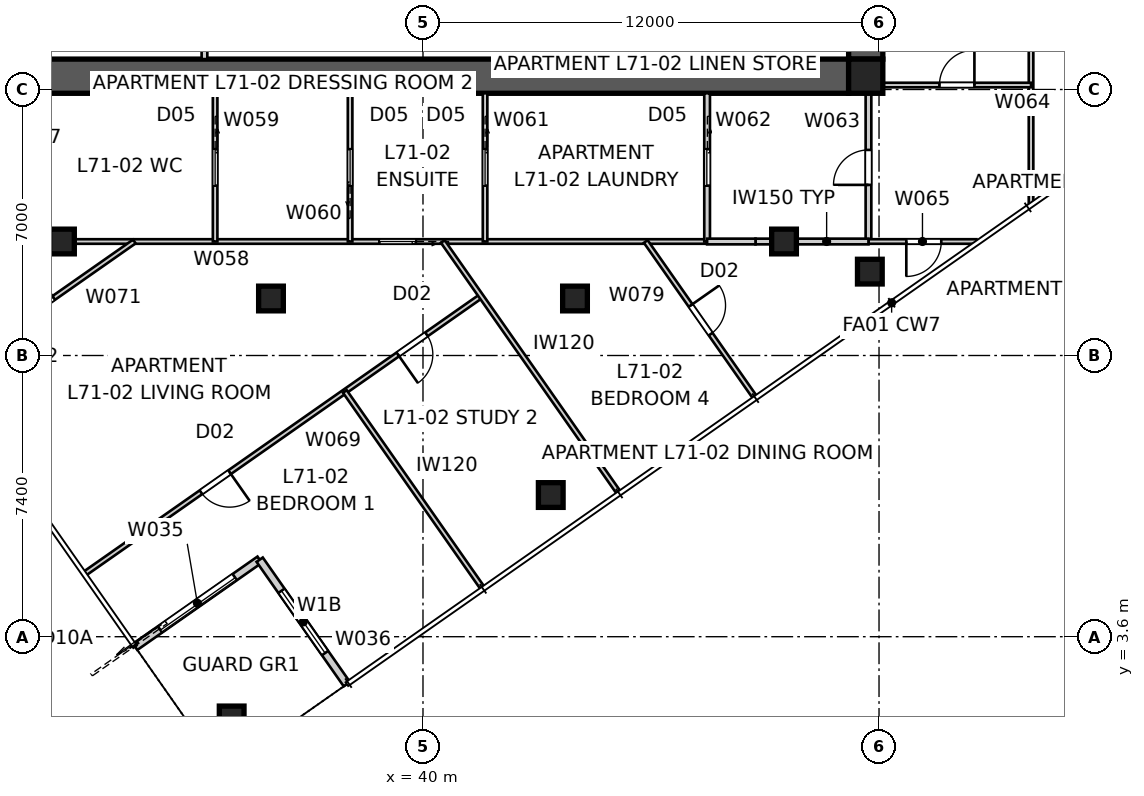
"""IFC4 building model, lengths in metres.
Left out: names, types, materials, properties, quantities, classifications, styles, units other than length and angle.
Written with IfcOpenShell. Run it as: python <this file> out.ifc"""

import sys

from ifc_helpers import new_model, si_unit, direction, frame, frame_2d, origin, origin_2d, place, context, subcontext, project, spatial, polyline, rectangle, outline, extrude, element, fill, save


model = new_model("IFC4")
c1 = context("Model", 3, precision=1e-05, world=origin(), true_north=direction((0.0, 1.0)))
c2 = subcontext(c1, "Body", "Model", "MODEL_VIEW")
j1 = project(units=[si_unit("LENGTHUNIT", "METRE"), si_unit("PLANEANGLEUNIT", "RADIAN")], contexts=[c1])
p1 = place(None, origin())
s1 = spatial("IfcSite", under=j1, at=p1, CompositionType="ELEMENT")
p2 = place(p1, origin())
s2 = spatial("IfcBuilding", under=s1, at=p2, CompositionType="ELEMENT")
p3 = place(p2, frame((0.0, 0.0, 257.4)))
s3 = spatial("IfcBuildingStorey", under=s2, at=p3, CompositionType="ELEMENT", Elevation=257.4)
p4 = place(p3, frame((51.2, 18.35, 0.0), z_axis=(0.0, 0.0, 1.0), x_axis=(-1.0, 0.0, 0.0)))
e1 = element("IfcWall", 1, at=p4, inside=s3, PredefinedType="SHEAR", context=c2, shape_type="SweptSolid", body=[
    extrude(outline(polyline([(0.0, -0.45), (22.4, -0.45), (22.4, -0.025), (22.85, -0.025), (22.85, 0.025), (22.4, 0.025), (22.4, 0.45), (0.0, 0.45), (0.0, 0.025), (-0.45, 0.025), (-0.45, -0.025), (0.0, -0.025), (0.0, -0.45)])), origin(), (0.0, 0.0, 1.0), 3.4),
])
p5 = place(p3, frame((51.65, 18.8, 0.0), z_axis=(0.0, 0.0, 1.0), x_axis=(0.0, 1.0, 0.0)))
e2 = element("IfcWall", 2, at=p5, inside=s3, PredefinedType="SHEAR", context=c2, shape_type="SweptSolid", body=[
    extrude(outline(polyline([(0.0, -0.45), (22.4, -0.45), (22.4, -0.025), (22.85, -0.025), (22.85, 0.025), (22.4, 0.025), (22.4, 0.45), (0.0, 0.45), (0.0, 0.025), (-0.45, 0.025), (-0.45, -0.025), (0.0, -0.025), (0.0, -0.45)])), origin(), (0.0, 0.0, 1.0), 3.4),
])
p6 = place(p5, frame((11.14, 0.0, 0.0)))
e3 = element("IfcOpeningElement", 3, at=p6, cuts=e2, PredefinedType="OPENING", context=c2, shape_type="SweptSolid", body=[
    extrude(rectangle(XDim=1.02, YDim=2.4, at=frame_2d((0.51, 1.2))), frame((0.0, 0.46, 0.0), z_axis=(0.0, -1.0, 0.0), x_axis=(1.0, 0.0, 0.0)), (0.0, 0.0, 1.0), 0.92),
])
p7 = place(p3, frame((51.65, 18.35, 0.0), z_axis=(0.0, 0.0, 1.0), x_axis=(1.0, 0.0, 0.0)))
e4 = element("IfcColumn", 4, at=p7, inside=s3, PredefinedType="COLUMN", context=c2, shape_type="SweptSolid", body=[
    extrude(rectangle(XDim=0.9, YDim=0.9, at=origin_2d()), origin(), (0.0, 0.0, 1.0), 3.4),
])
for number, where, z_axis, x_axis in (
    (5, (34.966, 1.449, 0.0), (0.0, 0.0, 1.0), (1.0, 0.0, 0.0)),
    (6, (43.362, 7.328, 0.0), (0.0, 0.0, 1.0), (1.0, 0.0, 0.0)),
    (7, (51.758, 13.207, 0.0), (0.0, 0.0, 1.0), (1.0, 0.0, 0.0)),
    (8, (30.5, 14.0, 0.0), (0.0, 0.0, 1.0), (1.0, 0.0, 0.0)),
    (9, (36.0, 12.5, 0.0), (0.0, 0.0, 1.0), (1.0, 0.0, 0.0)),
    (10, (44.0, 12.5, 0.0), (0.0, 0.0, 1.0), (1.0, 0.0, 0.0)),
    (11, (49.5, 14.0, 0.0), (0.0, 0.0, 1.0), (1.0, 0.0, 0.0)),
):
    element("IfcColumn", number, at=place(p3, frame(where, z_axis=z_axis, x_axis=x_axis)), inside=s3, PredefinedType="COLUMN", context=c2, shape_type="SweptSolid", body=[
        extrude(rectangle(XDim=0.65, YDim=0.65, at=origin_2d()), origin(), (0.0, 0.0, 1.0), 3.4),
    ])
p8 = place(p3, frame((32.426, 3.333, 0.0), z_axis=(0.0, 0.0, 1.0), x_axis=(0.819165963305, 0.573556557423, 0.0)))
e12 = element("IfcWall", 12, at=p8, inside=s3, PredefinedType="SOLIDWALL", context=c2, shape_type="SweptSolid", body=[
    extrude(rectangle(XDim=4.0, YDim=0.2, at=frame_2d((2.0, 0.0))), origin(), (0.0, 0.0, 1.0), 3.25),
])
p9 = place(p8, frame((0.8, 0.0, 0.0)))
e13 = element("IfcOpeningElement", 13, at=p9, cuts=e12, PredefinedType="OPENING", context=c2, shape_type="SweptSolid", body=[
    extrude(rectangle(XDim=2.4, YDim=2.1, at=frame_2d((1.2, 1.05))), frame((0.0, 0.11, 0.0), z_axis=(0.0, -1.0, 0.0), x_axis=(1.0, 0.0, 0.0)), (0.0, 0.0, 1.0), 0.22),
])
p10 = place(p3, frame((35.702, 5.627, 0.0), z_axis=(0.0, 0.0, 1.0), x_axis=(0.573597512525, -0.819137286189, 0.0)))
e14 = element("IfcWall", 14, at=p10, inside=s3, PredefinedType="SOLIDWALL", context=c2, shape_type="SweptSolid", body=[
    extrude(rectangle(XDim=4.0, YDim=0.2, at=frame_2d((2.0, 0.0))), origin(), (0.0, 0.0, 1.0), 3.25),
])
p11 = place(p10, frame((1.0, 0.0, 0.45)))
e15 = element("IfcOpeningElement", 15, at=p11, cuts=e14, PredefinedType="OPENING", context=c2, shape_type="SweptSolid", body=[
    extrude(rectangle(XDim=2.0, YDim=1.8, at=frame_2d((1.0, 0.9))), frame((0.0, 0.11, 0.0), z_axis=(0.0, -1.0, 0.0), x_axis=(1.0, 0.0, 0.0)), (0.0, 0.0, 1.0), 0.22),
])
p12 = place(p3, frame((45.75, 18.8, 0.0), z_axis=(0.0, 0.0, 1.0), x_axis=(0.0, 1.0, 0.0)))
e16 = element("IfcWall", 16, at=p12, inside=s3, PredefinedType="SOLIDWALL", context=c2, shape_type="SweptSolid", body=[
    extrude(rectangle(XDim=5.95, YDim=0.15, at=frame_2d((2.975, 0.0))), origin(), (0.0, 0.0, 1.0), 3.25),
])
p13 = place(p12, frame((2.515, 0.0, 0.0)))
e17 = element("IfcOpeningElement", 17, at=p13, cuts=e16, PredefinedType="OPENING", context=c2, shape_type="SweptSolid", body=[
    extrude(rectangle(XDim=0.92, YDim=2.1, at=frame_2d((0.46, 1.05))), frame((0.0, 0.085, 0.0), z_axis=(0.0, -1.0, 0.0), x_axis=(1.0, 0.0, 0.0)), (0.0, 0.0, 1.0), 0.17),
])
p14 = place(p3, frame((34.25, 18.8, 0.0), z_axis=(0.0, 0.0, 1.0), x_axis=(0.0, 1.0, 0.0)))
e18 = element("IfcWall", 18, at=p14, inside=s3, PredefinedType="SOLIDWALL", context=c2, shape_type="SweptSolid", body=[
    extrude(rectangle(XDim=5.9, YDim=0.15, at=frame_2d((2.95, 0.0))), origin(), (0.0, 0.0, 1.0), 3.25),
])
p15 = place(p3, frame((56.0, 41.203, 0.0), z_axis=(0.0, 0.0, 1.0), x_axis=(0.0, -1.0, 0.0)))
e19 = element("IfcWall", 19, at=p15, inside=s3, PredefinedType="PARTITIONING", context=c2, shape_type="SweptSolid", body=[
    extrude(rectangle(XDim=26.198, YDim=0.12, at=frame_2d((13.099, 0.0))), origin(), (0.0, 0.0, 1.0), 2.55),
])
p16 = place(p15, frame((21.188, 0.0, 0.0)))
e20 = element("IfcOpeningElement", 20, at=p16, cuts=e19, PredefinedType="OPENING", context=c2, shape_type="SweptSolid", body=[
    extrude(rectangle(XDim=0.92, YDim=2.34, at=frame_2d((0.46, 1.17))), frame((0.0, 0.07, 0.0), z_axis=(0.0, -1.0, 0.0), x_axis=(1.0, 0.0, 0.0)), (0.0, 0.0, 1.0), 0.14),
])
p17 = place(p15, frame((17.537, 0.0, 0.0)))
e21 = element("IfcOpeningElement", 21, at=p17, cuts=e19, PredefinedType="OPENING", context=c2, shape_type="SweptSolid", body=[
    extrude(rectangle(XDim=0.92, YDim=2.34, at=frame_2d((0.46, 1.17))), frame((0.0, 0.07, 0.0), z_axis=(0.0, -1.0, 0.0), x_axis=(1.0, 0.0, 0.0)), (0.0, 0.0, 1.0), 0.14),
])
p18 = place(p15, frame((2.221, 0.0, 0.0)))
e22 = element("IfcOpeningElement", 22, at=p18, cuts=e19, PredefinedType="OPENING", context=c2, shape_type="SweptSolid", body=[
    extrude(rectangle(XDim=0.96, YDim=2.1, at=frame_2d((0.48, 1.05))), frame((0.0, 0.07, 0.0), z_axis=(0.0, -1.0, 0.0), x_axis=(1.0, 0.0, 0.0)), (0.0, 0.0, 1.0), 0.14),
])
p19 = place(p3, frame((47.476, 14.0, 0.0), z_axis=(0.0, 0.0, 1.0), x_axis=(-1.0, 0.0, 0.0)))
e23 = element("IfcWall", 23, at=p19, inside=s3, PredefinedType="PARTITIONING", context=c2, shape_type="SweptSolid", body=[
    extrude(rectangle(XDim=22.471, YDim=0.12, at=frame_2d((11.235, 0.0))), origin(), (0.0, 0.0, 1.0), 2.55),
])
p20 = place(p19, frame((7.664, 0.0, 0.0)))
e24 = element("IfcOpeningElement", 24, at=p20, cuts=e23, PredefinedType="OPENING", context=c2, shape_type="SweptSolid", body=[
    extrude(rectangle(XDim=0.96, YDim=2.1, at=frame_2d((0.48, 1.05))), frame((0.0, 0.07, 0.0), z_axis=(0.0, -1.0, 0.0), x_axis=(1.0, 0.0, 0.0)), (0.0, 0.0, 1.0), 0.14),
])
p21 = place(p3, frame((34.53, 17.9, 0.0), z_axis=(0.0, 0.0, 1.0), x_axis=(0.0, -1.0, 0.0)))
e25 = element("IfcWall", 25, at=p21, inside=s3, PredefinedType="PARTITIONING", context=c2, shape_type="SweptSolid", body=[
    extrude(rectangle(XDim=3.9, YDim=0.12, at=frame_2d((1.95, 0.0))), origin(), (0.0, 0.0, 1.0), 3.25),
])
p22 = place(p21, frame((1.47, 0.0, 0.0)))
e26 = element("IfcOpeningElement", 26, at=p22, cuts=e25, PredefinedType="OPENING", context=c2, shape_type="SweptSolid", body=[
    extrude(rectangle(XDim=0.96, YDim=2.1, at=frame_2d((0.48, 1.05))), frame((0.0, 0.07, 0.0), z_axis=(0.0, -1.0, 0.0), x_axis=(1.0, 0.0, 0.0)), (0.0, 0.0, 1.0), 0.14),
])
p23 = place(p3, frame((38.082, 14.0, 0.0), z_axis=(0.0, 0.0, 1.0), x_axis=(0.0, 1.0, 0.0)))
e27 = element("IfcWall", 27, at=p23, inside=s3, PredefinedType="PARTITIONING", context=c2, shape_type="SweptSolid", body=[
    extrude(rectangle(XDim=3.9, YDim=0.12, at=frame_2d((1.95, 0.0))), origin(), (0.0, 0.0, 1.0), 3.25),
])
p24 = place(p23, frame((1.47, 0.0, 0.0)))
e28 = element("IfcOpeningElement", 28, at=p24, cuts=e27, PredefinedType="OPENING", context=c2, shape_type="SweptSolid", body=[
    extrude(rectangle(XDim=0.96, YDim=2.1, at=frame_2d((0.48, 1.05))), frame((0.0, 0.07, 0.0), z_axis=(0.0, -1.0, 0.0), x_axis=(1.0, 0.0, 0.0)), (0.0, 0.0, 1.0), 0.14),
])
p25 = place(p3, frame((41.634, 17.9, 0.0), z_axis=(0.0, 0.0, 1.0), x_axis=(0.0, -1.0, 0.0)))
e29 = element("IfcWall", 29, at=p25, inside=s3, PredefinedType="PARTITIONING", context=c2, shape_type="SweptSolid", body=[
    extrude(rectangle(XDim=3.9, YDim=0.12, at=frame_2d((1.95, 0.0))), origin(), (0.0, 0.0, 1.0), 3.25),
])
p26 = place(p25, frame((1.47, 0.0, 0.0)))
e30 = element("IfcOpeningElement", 30, at=p26, cuts=e29, PredefinedType="OPENING", context=c2, shape_type="SweptSolid", body=[
    extrude(rectangle(XDim=0.96, YDim=2.1, at=frame_2d((0.48, 1.05))), frame((0.0, 0.07, 0.0), z_axis=(0.0, -1.0, 0.0), x_axis=(1.0, 0.0, 0.0)), (0.0, 0.0, 1.0), 0.14),
])
p27 = place(p3, frame((47.476, 17.9, 0.0), z_axis=(0.0, 0.0, 1.0), x_axis=(0.0, -1.0, 0.0)))
e31 = element("IfcWall", 31, at=p27, inside=s3, PredefinedType="SOLIDWALL", context=c2, shape_type="SweptSolid", body=[
    extrude(rectangle(XDim=3.9, YDim=0.15, at=frame_2d((1.95, 0.0))), origin(), (0.0, 0.0, 1.0), 3.25),
])
p28 = place(p27, frame((1.47, 0.0, 0.0)))
e32 = element("IfcOpeningElement", 32, at=p28, cuts=e31, PredefinedType="OPENING", context=c2, shape_type="SweptSolid", body=[
    extrude(rectangle(XDim=0.96, YDim=2.1, at=frame_2d((0.48, 1.05))), frame((0.0, 0.085, 0.0), z_axis=(0.0, -1.0, 0.0), x_axis=(1.0, 0.0, 0.0)), (0.0, 0.0, 1.0), 0.17),
])
p29 = place(p3, frame((51.722, 14.0, 0.0), z_axis=(0.0, 0.0, 1.0), x_axis=(0.0, 1.0, 0.0)))
e33 = element("IfcWall", 33, at=p29, inside=s3, PredefinedType="SOLIDWALL", context=c2, shape_type="SweptSolid", body=[
    extrude(rectangle(XDim=4.82, YDim=0.15, at=frame_2d((2.41, 0.0))), origin(), (0.0, 0.0, 1.0), 3.25),
])
p30 = place(p29, frame((1.49, 0.0, 0.0)))
e34 = element("IfcOpeningElement", 34, at=p30, cuts=e33, PredefinedType="OPENING", context=c2, shape_type="SweptSolid", body=[
    extrude(rectangle(XDim=0.92, YDim=2.1, at=frame_2d((0.46, 1.05))), frame((0.0, 0.085, 0.0), z_axis=(0.0, -1.0, 0.0), x_axis=(1.0, 0.0, 0.0)), (0.0, 0.0, 1.0), 0.17),
])
p31 = place(p3, frame((51.777, 18.118, 0.0), z_axis=(0.0, 0.0, 1.0), x_axis=(1.0, 0.0, 0.0)))
e35 = element("IfcWall", 35, at=p31, inside=s3, PredefinedType="PARTITIONING", context=c2, shape_type="SweptSolid", body=[
    extrude(rectangle(XDim=4.223, YDim=0.12, at=frame_2d((2.111, 0.0))), origin(), (0.0, 0.0, 1.0), 3.25),
])
p32 = place(p31, frame((1.812, 0.0, 0.0)))
e36 = element("IfcOpeningElement", 36, at=p32, cuts=e35, PredefinedType="OPENING", context=c2, shape_type="SweptSolid", body=[
    extrude(rectangle(XDim=0.92, YDim=2.1, at=frame_2d((0.46, 1.05))), frame((0.0, 0.07, 0.0), z_axis=(0.0, -1.0, 0.0), x_axis=(1.0, 0.0, 0.0)), (0.0, 0.0, 1.0), 0.14),
])
p33 = place(p3, frame((54.564, 14.0, 0.0), z_axis=(0.0, 0.0, 1.0), x_axis=(-1.0, 0.0, 0.0)))
e37 = element("IfcWall", 37, at=p33, inside=s3, PredefinedType="PARTITIONING", context=c2, shape_type="SweptSolid", body=[
    extrude(rectangle(XDim=2.842, YDim=0.12, at=frame_2d((1.421, 0.0))), origin(), (0.0, 0.0, 1.0), 3.25),
])
p34 = place(p33, frame((0.926, 0.0, 0.0)))
e38 = element("IfcOpeningElement", 38, at=p34, cuts=e37, PredefinedType="OPENING", context=c2, shape_type="SweptSolid", body=[
    extrude(rectangle(XDim=0.92, YDim=2.1, at=frame_2d((0.46, 1.05))), frame((0.0, 0.07, 0.0), z_axis=(0.0, -1.0, 0.0), x_axis=(1.0, 0.0, 0.0)), (0.0, 0.0, 1.0), 0.14),
])
p35 = place(p3, frame((51.722, 14.0, 0.0), z_axis=(0.0, 0.0, 1.0), x_axis=(-1.0, 0.0, 0.0)))
e39 = element("IfcWall", 39, at=p35, inside=s3, PredefinedType="SOLIDWALL", context=c2, shape_type="SweptSolid", body=[
    extrude(rectangle(XDim=2.202, YDim=0.15, at=frame_2d((1.101, 0.0))), origin(), (0.0, 0.0, 1.0), 3.25),
])
p36 = place(p3, frame((49.521, 14.0, 0.0), z_axis=(0.0, 0.0, 1.0), x_axis=(-1.0, 0.0, 0.0)))
e40 = element("IfcWall", 40, at=p36, inside=s3, PredefinedType="SOLIDWALL", context=c2, shape_type="SweptSolid", body=[
    extrude(rectangle(XDim=0.771, YDim=0.15, at=frame_2d((0.385, 0.0))), origin(), (0.0, 0.0, 1.0), 2.55),
])
p37 = place(p3, frame((48.75, 14.0, 0.0), z_axis=(0.0, 0.0, 1.0), x_axis=(-1.0, 0.0, 0.0)))
e41 = element("IfcWall", 41, at=p37, inside=s3, PredefinedType="SOLIDWALL", context=c2, shape_type="SweptSolid", body=[
    extrude(rectangle(XDim=1.274, YDim=0.15, at=frame_2d((0.637, 0.0))), origin(), (0.0, 0.0, 1.0), 3.25),
])
p38 = place(p3, frame((41.528, 12.562, 0.0), z_axis=(0.0, 0.0, 1.0), x_axis=(-0.819146182185, -0.573584808212, 0.0)))
e42 = element("IfcWall", 42, at=p38, inside=s3, PredefinedType="PARTITIONING", context=c2, shape_type="SweptSolid", body=[
    extrude(rectangle(XDim=12.71, YDim=0.12, at=frame_2d((6.355, 0.0))), origin(), (0.0, 0.0, 1.0), 3.25),
])
p39 = place(p38, frame((8.077, 0.0, 0.0)))
e43 = element("IfcOpeningElement", 43, at=p39, cuts=e42, PredefinedType="OPENING", context=c2, shape_type="SweptSolid", body=[
    extrude(rectangle(XDim=0.92, YDim=2.34, at=frame_2d((0.46, 1.17))), frame((0.0, 0.07, 0.0), z_axis=(0.0, -1.0, 0.0), x_axis=(1.0, 0.0, 0.0)), (0.0, 0.0, 1.0), 0.14),
])
p40 = place(p38, frame((1.752, 0.0, 0.0)))
e44 = element("IfcOpeningElement", 44, at=p40, cuts=e42, PredefinedType="OPENING", context=c2, shape_type="SweptSolid", body=[
    extrude(rectangle(XDim=0.92, YDim=2.34, at=frame_2d((0.46, 1.17))), frame((0.0, 0.07, 0.0), z_axis=(0.0, -1.0, 0.0), x_axis=(1.0, 0.0, 0.0)), (0.0, 0.0, 1.0), 0.14),
])
p41 = place(p3, frame((40.521, 14.0, 0.0), z_axis=(0.0, 0.0, 1.0), x_axis=(0.573574225095, -0.819153592623, 0.0)))
e45 = element("IfcWall", 45, at=p41, inside=s3, PredefinedType="PARTITIONING", context=c2, shape_type="SweptSolid", body=[
    extrude(rectangle(XDim=8.054, YDim=0.12, at=frame_2d((4.027, 0.0))), origin(), (0.0, 0.0, 1.0), 3.25),
])
p42 = place(p3, frame((27.44, 10.523, 0.0), z_axis=(0.0, 0.0, 1.0), x_axis=(0.81915432861, 0.573573173989, 0.0)))
e46 = element("IfcWall", 46, at=p42, inside=s3, PredefinedType="PARTITIONING", context=c2, shape_type="SweptSolid", body=[
    extrude(rectangle(XDim=6.061, YDim=0.12, at=frame_2d((3.031, 0.0))), origin(), (0.0, 0.0, 1.0), 3.25),
])
p43 = place(p42, frame((2.551, 0.0, 0.0)))
e47 = element("IfcOpeningElement", 47, at=p43, cuts=e46, PredefinedType="OPENING", context=c2, shape_type="SweptSolid", body=[
    extrude(rectangle(XDim=0.92, YDim=2.34, at=frame_2d((0.46, 1.17))), frame((0.0, 0.07, 0.0), z_axis=(0.0, -1.0, 0.0), x_axis=(1.0, 0.0, 0.0)), (0.0, 0.0, 1.0), 0.14),
])
p44 = place(p3, frame((37.944, 10.053, 0.0), z_axis=(0.0, 0.0, 1.0), x_axis=(0.573587188897, -0.81914451517, 0.0)))
e48 = element("IfcWall", 48, at=p44, inside=s3, PredefinedType="PARTITIONING", context=c2, shape_type="SweptSolid", body=[
    extrude(rectangle(XDim=6.3, YDim=0.12, at=frame_2d((3.15, 0.0))), origin(), (0.0, 0.0, 1.0), 3.25),
])
p45 = place(p3, frame((59.477, 17.44, 0.0), z_axis=(0.0, 0.0, 1.0), x_axis=(-0.573573173989, 0.81915432861, 0.0)))
e49 = element("IfcWall", 49, at=p45, inside=s3, PredefinedType="PARTITIONING", context=c2, shape_type="SweptSolid", body=[
    extrude(rectangle(XDim=6.061, YDim=0.12, at=frame_2d((3.031, 0.0))), origin(), (0.0, 0.0, 1.0), 3.25),
])
p46 = place(p3, frame((45.862, 14.0, 0.0), z_axis=(0.0, 0.0, 1.0), x_axis=(0.57358708951, -0.819144584763, 0.0)))
e50 = element("IfcWall", 50, at=p46, inside=s3, PredefinedType="PARTITIONING", context=c2, shape_type="SweptSolid", body=[
    extrude(rectangle(XDim=4.991, YDim=0.12, at=frame_2d((2.496, 0.0))), origin(), (0.0, 0.0, 1.0), 3.25),
])
p47 = place(p46, frame((2.055, 0.0, 0.0)))
e51 = element("IfcOpeningElement", 51, at=p47, cuts=e50, PredefinedType="OPENING", context=c2, shape_type="SweptSolid", body=[
    extrude(rectangle(XDim=0.92, YDim=2.34, at=frame_2d((0.46, 1.17))), frame((0.0, 0.07, 0.0), z_axis=(0.0, -1.0, 0.0), x_axis=(1.0, 0.0, 0.0)), (0.0, 0.0, 1.0), 0.14),
])
p48 = place(p9, origin())
e52 = element("IfcDoor", 52, at=p48, inside=s3, OperationType="SLIDING_TO_LEFT", PredefinedType="DOOR", context=c2, shape_type="SweptSolid", body=[
    extrude(rectangle(XDim=2.4, YDim=2.1, at=frame_2d((1.2, 1.05))), frame((0.0, 0.025, 0.0), z_axis=(0.0, -1.0, 0.0), x_axis=(1.0, 0.0, 0.0)), (0.0, 0.0, 1.0), 0.05),
])
fill(e13, e52)
p49 = place(p11, origin())
e53 = element("IfcWindow", 53, at=p49, inside=s3, PartitioningType="SINGLE_PANEL", PredefinedType="WINDOW", context=c2, shape_type="SweptSolid", body=[
    extrude(rectangle(XDim=2.0, YDim=1.8, at=frame_2d((1.0, 0.9))), frame((0.0, 0.03, 0.0), z_axis=(0.0, -1.0, 0.0), x_axis=(1.0, 0.0, 0.0)), (0.0, 0.0, 1.0), 0.06),
])
fill(e15, e53)
p50 = place(p32, origin())
e54 = element("IfcDoor", 54, at=p50, inside=s3, OperationType="SINGLE_SWING_RIGHT", PredefinedType="DOOR", context=c2, shape_type="SweptSolid", body=[
    extrude(rectangle(XDim=0.92, YDim=2.1, at=frame_2d((0.46, 1.05))), frame((0.0, 0.025, 0.0), z_axis=(0.0, -1.0, 0.0), x_axis=(1.0, 0.0, 0.0)), (0.0, 0.0, 1.0), 0.05),
])
fill(e36, e54)
p51 = place(p30, origin())
e55 = element("IfcDoor", 55, at=p51, inside=s3, OperationType="SINGLE_SWING_LEFT", PredefinedType="DOOR", context=c2, shape_type="SweptSolid", body=[
    extrude(rectangle(XDim=0.92, YDim=2.1, at=frame_2d((0.46, 1.05))), frame((0.0, 0.025, 0.0), z_axis=(0.0, -1.0, 0.0), x_axis=(1.0, 0.0, 0.0)), (0.0, 0.0, 1.0), 0.05),
])
fill(e34, e55)
p52 = place(p34, origin())
e56 = element("IfcDoor", 56, at=p52, inside=s3, OperationType="SINGLE_SWING_RIGHT", PredefinedType="DOOR", context=c2, shape_type="SweptSolid", body=[
    extrude(rectangle(XDim=0.92, YDim=2.1, at=frame_2d((0.46, 1.05))), frame((0.0, 0.025, 0.0), z_axis=(0.0, -1.0, 0.0), x_axis=(1.0, 0.0, 0.0)), (0.0, 0.0, 1.0), 0.05),
])
fill(e38, e56)
p53 = place(p28, origin())
e57 = element("IfcDoor", 57, at=p53, inside=s3, OperationType="SLIDING_TO_LEFT", PredefinedType="DOOR", context=c2, shape_type="SweptSolid", body=[
    extrude(rectangle(XDim=0.96, YDim=2.1, at=frame_2d((0.48, 1.05))), frame((0.0, 0.025, 0.0), z_axis=(0.0, -1.0, 0.0), x_axis=(1.0, 0.0, 0.0)), (0.0, 0.0, 1.0), 0.05),
])
fill(e32, e57)
p54 = place(p47, origin())
e58 = element("IfcDoor", 58, at=p54, inside=s3, OperationType="SINGLE_SWING_LEFT", PredefinedType="DOOR", context=c2, shape_type="SweptSolid", body=[
    extrude(rectangle(XDim=0.92, YDim=2.34, at=frame_2d((0.46, 1.17))), frame((0.0, 0.025, 0.0), z_axis=(0.0, -1.0, 0.0), x_axis=(1.0, 0.0, 0.0)), (0.0, 0.0, 1.0), 0.05),
])
fill(e51, e58)
p55 = place(p26, origin())
e59 = element("IfcDoor", 59, at=p55, inside=s3, OperationType="SLIDING_TO_LEFT", PredefinedType="DOOR", context=c2, shape_type="SweptSolid", body=[
    extrude(rectangle(XDim=0.96, YDim=2.1, at=frame_2d((0.48, 1.05))), frame((0.0, 0.025, 0.0), z_axis=(0.0, -1.0, 0.0), x_axis=(1.0, 0.0, 0.0)), (0.0, 0.0, 1.0), 0.05),
])
fill(e30, e59)
p56 = place(p24, origin())
e60 = element("IfcDoor", 60, at=p56, inside=s3, OperationType="SLIDING_TO_LEFT", PredefinedType="DOOR", context=c2, shape_type="SweptSolid", body=[
    extrude(rectangle(XDim=0.96, YDim=2.1, at=frame_2d((0.48, 1.05))), frame((0.0, 0.025, 0.0), z_axis=(0.0, -1.0, 0.0), x_axis=(1.0, 0.0, 0.0)), (0.0, 0.0, 1.0), 0.05),
])
fill(e28, e60)
p57 = place(p20, origin())
e61 = element("IfcDoor", 61, at=p57, inside=s3, OperationType="SLIDING_TO_LEFT", PredefinedType="DOOR", context=c2, shape_type="SweptSolid", body=[
    extrude(rectangle(XDim=0.96, YDim=2.1, at=frame_2d((0.48, 1.05))), frame((0.0, 0.025, 0.0), z_axis=(0.0, -1.0, 0.0), x_axis=(1.0, 0.0, 0.0)), (0.0, 0.0, 1.0), 0.05),
])
fill(e24, e61)
p58 = place(p22, origin())
e62 = element("IfcDoor", 62, at=p58, inside=s3, OperationType="SLIDING_TO_LEFT", PredefinedType="DOOR", context=c2, shape_type="SweptSolid", body=[
    extrude(rectangle(XDim=0.96, YDim=2.1, at=frame_2d((0.48, 1.05))), frame((0.0, 0.025, 0.0), z_axis=(0.0, -1.0, 0.0), x_axis=(1.0, 0.0, 0.0)), (0.0, 0.0, 1.0), 0.05),
])
fill(e26, e62)
p59 = place(p39, origin())
e63 = element("IfcDoor", 63, at=p59, inside=s3, OperationType="SINGLE_SWING_LEFT", PredefinedType="DOOR", context=c2, shape_type="SweptSolid", body=[
    extrude(rectangle(XDim=0.92, YDim=2.34, at=frame_2d((0.46, 1.17))), frame((0.0, 0.025, 0.0), z_axis=(0.0, -1.0, 0.0), x_axis=(1.0, 0.0, 0.0)), (0.0, 0.0, 1.0), 0.05),
])
fill(e43, e63)
p60 = place(p43, origin())
e64 = element("IfcDoor", 64, at=p60, inside=s3, OperationType="SINGLE_SWING_RIGHT", PredefinedType="DOOR", context=c2, shape_type="SweptSolid", body=[
    extrude(rectangle(XDim=0.92, YDim=2.34, at=frame_2d((0.46, 1.17))), frame((0.0, 0.025, 0.0), z_axis=(0.0, -1.0, 0.0), x_axis=(1.0, 0.0, 0.0)), (0.0, 0.0, 1.0), 0.05),
])
fill(e47, e64)
p61 = place(p40, origin())
e65 = element("IfcDoor", 65, at=p61, inside=s3, OperationType="SINGLE_SWING_RIGHT", PredefinedType="DOOR", context=c2, shape_type="SweptSolid", body=[
    extrude(rectangle(XDim=0.92, YDim=2.34, at=frame_2d((0.46, 1.17))), frame((0.0, 0.025, 0.0), z_axis=(0.0, -1.0, 0.0), x_axis=(1.0, 0.0, 0.0)), (0.0, 0.0, 1.0), 0.05),
])
fill(e44, e65)
save(model, sys.argv[1])
